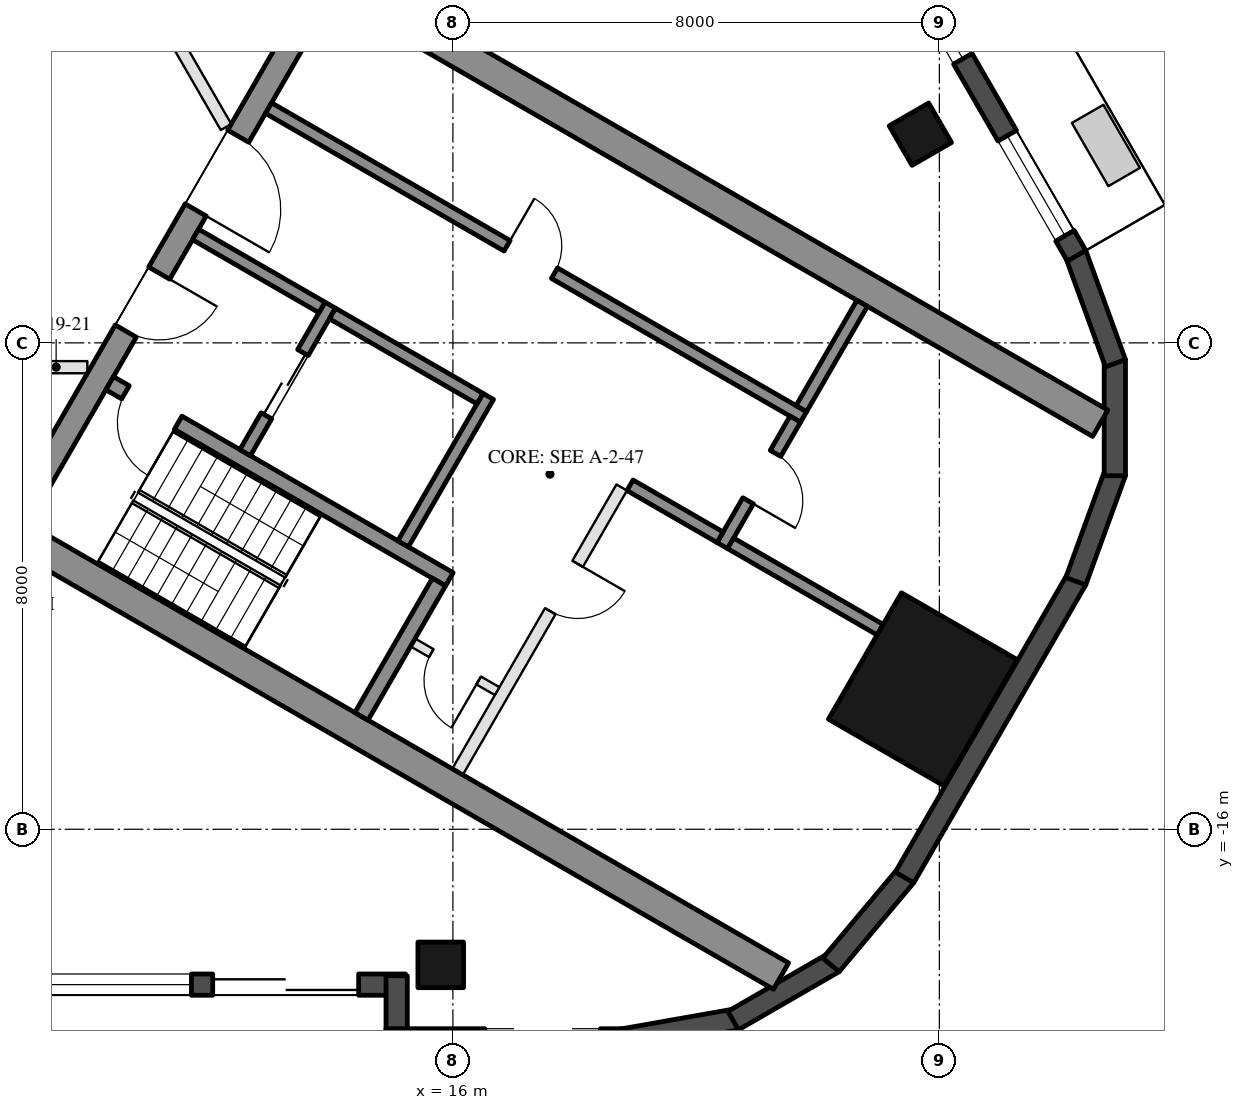
"""IFC4 building model, lengths in metres.
Left out: names, types, materials, properties, quantities, classifications, styles, units other than length and angle.
Written with IfcOpenShell. Run it as: python <this file> out.ifc"""

import sys

from ifc_helpers import new_model, si_unit, direction, frame, frame_2d, origin, origin_2d, place, context, subcontext, project, spatial, rectangle, hollow_rectangle, extrude, element, fill, save


model = new_model("IFC4")
c1 = context("Model", 3, precision=1e-05, world=origin(), true_north=direction((0.0, 1.0)))
c2 = subcontext(c1, "Body", "Model", "MODEL_VIEW")
j1 = project(units=[si_unit("LENGTHUNIT", "METRE"), si_unit("PLANEANGLEUNIT", "RADIAN")], contexts=[c1])
p1 = place(None, origin())
s1 = spatial("IfcSite", under=j1, at=p1, CompositionType="ELEMENT")
p2 = place(p1, origin())
s2 = spatial("IfcBuilding", under=s1, at=p2, CompositionType="ELEMENT")
p3 = place(p2, frame((0.0, 0.0, 205.8)))
s3 = spatial("IfcBuildingStorey", under=s2, at=p3, CompositionType="ELEMENT", Elevation=205.8)
for number, where, z_axis, x_axis in (
    (1, (15.8, -18.23, 0.0), (0.0, 0.0, 1.0), (-1.0, 0.0, 0.0)),
    (2, (23.688, -4.568, 0.0), (0.0, 0.0, 1.0), (-0.5, 0.866, 0.0)),
):
    element("IfcColumn", number, at=place(p3, frame(where, z_axis=z_axis, x_axis=x_axis)), inside=s3, PredefinedType="COLUMN", context=c2, shape_type="SweptSolid", body=[
        extrude(hollow_rectangle(XDim=0.75, YDim=0.75, WallThickness=0.035, at=origin_2d()), origin(), (0.0, 0.0, 1.0), 3.7),
    ])
p4 = place(p3, frame((23.729, -13.7, 0.0), z_axis=(0.0, 0.0, 1.0), x_axis=(0.5, 0.866025403784, 0.0)))
e3 = element("IfcColumn", 3, at=p4, inside=s3, PredefinedType="COLUMN", context=c2, shape_type="SweptSolid", body=[
    extrude(hollow_rectangle(XDim=2.4, YDim=2.2, WallThickness=0.06, at=origin_2d()), origin(), (0.0, 0.0, 1.0), 3.7),
])
p5 = place(p3, frame((8.48, -18.555, 0.0), z_axis=(0.0, 0.0, 1.0), x_axis=(1.0, 0.0, 0.0)))
e4 = element("IfcWall", 4, at=p5, inside=s3, PredefinedType="SOLIDWALL", context=c2, shape_type="SweptSolid", body=[
    extrude(rectangle(XDim=6.74, YDim=0.35, at=frame_2d((3.37, 0.0))), origin(), (0.0, 0.0, 1.0), 3.55),
])
p6 = place(p5, frame((3.57, 0.0, 0.0)))
e5 = element("IfcOpeningElement", 5, at=p6, cuts=e4, PredefinedType="OPENING", context=c2, shape_type="SweptSolid", body=[
    extrude(rectangle(XDim=2.4, YDim=2.4, at=frame_2d((1.2, 1.2))), frame((0.0, 0.185, 0.0), z_axis=(0.0, -1.0, 0.0), x_axis=(1.0, 0.0, 0.0)), (0.0, 0.0, 1.0), 0.37),
])
p7 = place(p5, frame((0.32, 0.0, 0.3)))
e6 = element("IfcOpeningElement", 6, at=p7, cuts=e4, PredefinedType="OPENING", context=c2, shape_type="SweptSolid", body=[
    extrude(rectangle(XDim=2.9, YDim=2.65, at=frame_2d((1.45, 1.325))), frame((0.0, 0.185, 0.0), z_axis=(0.0, -1.0, 0.0), x_axis=(1.0, 0.0, 0.0)), (0.0, 0.0, 1.0), 0.37),
])
p8 = place(p3, frame((15.075, -18.41, 0.0), z_axis=(0.0, 0.0, 1.0), x_axis=(0.0, -1.0, 0.0)))
e7 = element("IfcWall", 7, at=p8, inside=s3, PredefinedType="SOLIDWALL", context=c2, shape_type="SweptSolid", body=[
    extrude(rectangle(XDim=1.22, YDim=0.35, at=frame_2d((0.61, 0.0))), origin(), (0.0, 0.0, 1.0), 3.55),
])
p9 = place(p3, frame((14.9, -19.455, 0.0), z_axis=(0.0, 0.0, 1.0), x_axis=(1.0, 0.0, 0.0)))
e8 = element("IfcWall", 8, at=p9, inside=s3, PredefinedType="SOLIDWALL", context=c2, shape_type="SweptSolid", body=[
    extrude(rectangle(XDim=3.916, YDim=0.35, at=frame_2d((1.958, 0.0))), origin(), (0.0, 0.0, 1.0), 3.55),
])
p10 = place(p9, frame((1.625, 0.0, 0.3)))
e9 = element("IfcOpeningElement", 9, at=p10, cuts=e8, PredefinedType="OPENING", context=c2, shape_type="SweptSolid", body=[
    extrude(rectangle(XDim=1.9, YDim=2.65, at=frame_2d((0.95, 1.325))), frame((0.0, 0.185, 0.0), z_axis=(0.0, -1.0, 0.0), x_axis=(1.0, 0.0, 0.0)), (0.0, 0.0, 1.0), 0.37),
])
p11 = place(p3, frame((18.785, -19.458, 0.0), z_axis=(0.0, 0.0, 1.0), x_axis=(0.984798995425, 0.173697837091, 0.0)))
e10 = element("IfcWall", 10, at=p11, inside=s3, PredefinedType="SOLIDWALL", context=c2, shape_type="SweptSolid", body=[
    extrude(rectangle(XDim=1.91, YDim=0.35, at=frame_2d((0.955, 0.0))), origin(), (0.0, 0.0, 1.0), 3.55),
])
for number, where, z_axis, x_axis in (
    (11, (20.61, -19.147, 0.0), (0.0, 0.0, 1.0), (0.866, 0.5, 0.0)),
    (12, (22.217, -18.231, 0.0), (0.0, 0.0, 1.0), (0.643, 0.766, 0.0)),
):
    element("IfcWall", number, at=place(p3, frame(where, z_axis=z_axis, x_axis=x_axis)), inside=s3, PredefinedType="SOLIDWALL", context=c2, shape_type="SweptSolid", body=[
        extrude(rectangle(XDim=1.91, YDim=0.35, at=frame_2d((0.955, 0.0))), origin(), (0.0, 0.0, 1.0), 3.55),
    ])
p12 = place(p3, frame((23.427, -16.792, 0.0), z_axis=(0.0, 0.0, 1.0), x_axis=(0.500018773155, 0.866014564827, 0.0)))
e13 = element("IfcWall", 13, at=p12, inside=s3, PredefinedType="SOLIDWALL", context=c2, shape_type="SweptSolid", body=[
    extrude(rectangle(XDim=5.658, YDim=0.35, at=frame_2d((2.829, 0.0))), origin(), (0.0, 0.0, 1.0), 3.55),
])
for number, where, z_axis, x_axis in (
    (14, (26.244, -11.92, 0.0), (0.0, 0.0, 1.0), (0.342, 0.94, 0.0)),
    (15, (26.886, -10.185, 0.0), (0.0, 0.0, 1.0), (0.0, 1.0, 0.0)),
    (16, (26.897, -8.335, 0.0), (0.0, 0.0, 1.0), (-0.342, 0.94, 0.0)),
):
    element("IfcWall", number, at=place(p3, frame(where, z_axis=z_axis, x_axis=x_axis)), inside=s3, PredefinedType="SOLIDWALL", context=c2, shape_type="SweptSolid", body=[
        extrude(rectangle(XDim=1.91, YDim=0.35, at=frame_2d((0.955, 0.0))), origin(), (0.0, 0.0, 1.0), 3.55),
    ])
p13 = place(p3, frame((26.257, -6.567, 0.0), z_axis=(0.0, 0.0, 1.0), x_axis=(-0.500023526245, 0.866011820475, 0.0)))
e17 = element("IfcWall", 17, at=p13, inside=s3, PredefinedType="SOLIDWALL", context=c2, shape_type="SweptSolid", body=[
    extrude(rectangle(XDim=11.816, YDim=0.35, at=frame_2d((5.908, 0.0))), origin(), (0.0, 0.0, 1.0), 3.55),
])
p14 = place(p13, frame((0.38, 0.0, 0.3)))
e18 = element("IfcOpeningElement", 18, at=p14, cuts=e17, PredefinedType="OPENING", context=c2, shape_type="SweptSolid", body=[
    extrude(rectangle(XDim=1.9, YDim=2.65, at=frame_2d((0.95, 1.325))), frame((0.0, 0.185, 0.0), z_axis=(0.0, -1.0, 0.0), x_axis=(1.0, 0.0, 0.0)), (0.0, 0.0, 1.0), 0.37),
])
p15 = place(p13, frame((7.791, 0.0, 0.0)))
e19 = element("IfcOpeningElement", 19, at=p15, cuts=e17, PredefinedType="OPENING", context=c2, shape_type="SweptSolid", body=[
    extrude(rectangle(XDim=2.4, YDim=2.4, at=frame_2d((1.2, 1.2))), frame((0.0, 0.185, 0.0), z_axis=(0.0, -1.0, 0.0), x_axis=(1.0, 0.0, 0.0)), (0.0, 0.0, 1.0), 0.37),
])
p16 = place(p13, frame((3.741, 0.0, 0.3)))
e20 = element("IfcOpeningElement", 20, at=p16, cuts=e17, PredefinedType="OPENING", context=c2, shape_type="SweptSolid", body=[
    extrude(rectangle(XDim=1.7, YDim=2.65, at=frame_2d((0.85, 1.325))), frame((0.0, 0.185, 0.0), z_axis=(0.0, -1.0, 0.0), x_axis=(1.0, 0.0, 0.0)), (0.0, 0.0, 1.0), 0.37),
])
p17 = place(p13, frame((5.741, 0.0, 0.3)))
e21 = element("IfcOpeningElement", 21, at=p17, cuts=e17, PredefinedType="OPENING", context=c2, shape_type="SweptSolid", body=[
    extrude(rectangle(XDim=1.7, YDim=2.65, at=frame_2d((0.85, 1.325))), frame((0.0, 0.185, 0.0), z_axis=(0.0, -1.0, 0.0), x_axis=(1.0, 0.0, 0.0)), (0.0, 0.0, 1.0), 0.37),
])
for number, where, z_axis, x_axis in (
    (22, (8.547, -10.997, 0.0), (0.0, 0.0, 1.0), (0.866, -0.5, 0.0)),
    (23, (13.797, -1.903, 0.0), (0.0, 0.0, 1.0), (0.866, -0.5, 0.0)),
):
    element("IfcWall", number, at=place(p3, frame(where, z_axis=z_axis, x_axis=x_axis)), inside=s3, PredefinedType="SHEAR", context=c2, shape_type="SweptSolid", body=[
        extrude(rectangle(XDim=14.837, YDim=0.5, at=frame_2d((7.418, 0.0))), origin(), (0.0, 0.0, 1.0), 3.5),
    ])
p18 = place(p3, frame((8.845, -10.88, 0.0), z_axis=(0.0, 0.0, 1.0), x_axis=(0.500004234368, 0.866022959057, 0.0)))
e24 = element("IfcWall", 24, at=p18, inside=s3, PredefinedType="SHEAR", context=c2, shape_type="SweptSolid", body=[
    extrude(rectangle(XDim=10.0, YDim=0.4, at=frame_2d((5.0, 0.0))), origin(), (0.0, 0.0, 1.0), 3.5),
])
p19 = place(p18, frame((3.55, 0.0, 0.0)))
e25 = element("IfcOpeningElement", 25, at=p19, cuts=e24, PredefinedType="OPENING", context=c2, shape_type="SweptSolid", body=[
    extrude(rectangle(XDim=1.1, YDim=2.1, at=frame_2d((0.55, 1.05))), frame((0.0, 0.21, 0.0), z_axis=(0.0, -1.0, 0.0), x_axis=(1.0, 0.0, 0.0)), (0.0, 0.0, 1.0), 0.42),
])
p20 = place(p18, frame((5.85, 0.0, 0.0)))
e26 = element("IfcOpeningElement", 26, at=p20, cuts=e24, PredefinedType="OPENING", context=c2, shape_type="SweptSolid", body=[
    extrude(rectangle(XDim=1.4, YDim=2.1, at=frame_2d((0.7, 1.05))), frame((0.0, 0.21, 0.0), z_axis=(0.0, -1.0, 0.0), x_axis=(1.0, 0.0, 0.0)), (0.0, 0.0, 1.0), 0.42),
])
p21 = place(p3, frame((10.356, -8.664, 0.0), z_axis=(0.0, 0.0, 1.0), x_axis=(0.866028629588, -0.499994412703, 0.0)))
e27 = element("IfcWall", 27, at=p21, inside=s3, PredefinedType="SHEAR", context=c2, shape_type="SweptSolid", body=[
    extrude(rectangle(XDim=6.45, YDim=0.25, at=frame_2d((3.225, 0.0))), origin(), (0.0, 0.0, 1.0), 3.5),
])
p22 = place(p21, frame((0.3, 0.0, 0.0)))
e28 = element("IfcOpeningElement", 28, at=p22, cuts=e27, PredefinedType="OPENING", context=c2, shape_type="SweptSolid", body=[
    extrude(rectangle(XDim=1.0, YDim=2.1, at=frame_2d((0.5, 1.05))), frame((0.0, 0.135, 0.0), z_axis=(0.0, -1.0, 0.0), x_axis=(1.0, 0.0, 0.0)), (0.0, 0.0, 1.0), 0.27),
])
p23 = place(p3, frame((14.496, -14.143, 0.0), z_axis=(0.0, 0.0, 1.0), x_axis=(0.500062241894, 0.865989465428, 0.0)))
e29 = element("IfcWall", 29, at=p23, inside=s3, PredefinedType="SHEAR", context=c2, shape_type="SweptSolid", body=[
    extrude(rectangle(XDim=2.55, YDim=0.25, at=frame_2d((1.275, 0.0))), origin(), (0.0, 0.0, 1.0), 3.5),
])
p24 = place(p3, frame((15.181, -11.305, 0.0), z_axis=(0.0, 0.0, 1.0), x_axis=(0.49994636267, 0.866056369097, 0.0)))
e30 = element("IfcWall", 30, at=p24, inside=s3, PredefinedType="SHEAR", context=c2, shape_type="SweptSolid", body=[
    extrude(rectangle(XDim=2.8, YDim=0.2, at=frame_2d((1.4, 0.0))), origin(), (0.0, 0.0, 1.0), 3.5),
])
p25 = place(p3, frame((12.583, -9.805, 0.0), z_axis=(0.0, 0.0, 1.0), x_axis=(0.49994636267, 0.866056369097, 0.0)))
e31 = element("IfcWall", 31, at=p25, inside=s3, PredefinedType="SHEAR", context=c2, shape_type="SweptSolid", body=[
    extrude(rectangle(XDim=2.8, YDim=0.2, at=frame_2d((1.4, 0.0))), origin(), (0.0, 0.0, 1.0), 3.5),
])
p26 = place(p25, frame((0.7, 0.0, 0.0)))
e32 = element("IfcOpeningElement", 32, at=p26, cuts=e31, PredefinedType="OPENING", context=c2, shape_type="SweptSolid", body=[
    extrude(rectangle(XDim=1.2, YDim=2.1, at=frame_2d((0.6, 1.05))), frame((0.0, 0.11, 0.0), z_axis=(0.0, -1.0, 0.0), x_axis=(1.0, 0.0, 0.0)), (0.0, 0.0, 1.0), 0.22),
])
p27 = place(p3, frame((11.768, -6.217, 0.0), z_axis=(0.0, 0.0, 1.0), x_axis=(0.866050077142, -0.499957262057, 0.0)))
e33 = element("IfcWall", 33, at=p27, inside=s3, PredefinedType="SHEAR", context=c2, shape_type="SweptSolid", body=[
    extrude(rectangle(XDim=2.4, YDim=0.2, at=frame_2d((1.2, 0.0))), origin(), (0.0, 0.0, 1.0), 3.5),
])
p28 = place(p3, frame((14.02, -7.517, 0.0), z_axis=(0.0, 0.0, 1.0), x_axis=(0.866034573852, -0.49998411664, 0.0)))
e34 = element("IfcWall", 34, at=p28, inside=s3, PredefinedType="SHEAR", context=c2, shape_type="SweptSolid", body=[
    extrude(rectangle(XDim=2.8, YDim=0.2, at=frame_2d((1.4, 0.0))), origin(), (0.0, 0.0, 1.0), 3.5),
])
p29 = place(p3, frame((12.968, -4.138, 0.0), z_axis=(0.0, 0.0, 1.0), x_axis=(0.866028328073, -0.49999493495, 0.0)))
e35 = element("IfcWall", 35, at=p29, inside=s3, PredefinedType="SHEAR", context=c2, shape_type="SweptSolid", body=[
    extrude(rectangle(XDim=10.16, YDim=0.2, at=frame_2d((5.08, 0.0))), origin(), (0.0, 0.0, 1.0), 3.5),
])
p30 = place(p29, frame((4.53, 0.0, 0.0)))
e36 = element("IfcOpeningElement", 36, at=p30, cuts=e35, PredefinedType="OPENING", context=c2, shape_type="SweptSolid", body=[
    extrude(rectangle(XDim=0.9, YDim=2.1, at=frame_2d((0.45, 1.05))), frame((0.0, 0.11, 0.0), z_axis=(0.0, -1.0, 0.0), x_axis=(1.0, 0.0, 0.0)), (0.0, 0.0, 1.0), 0.22),
])
p31 = place(p3, frame((20.43, -11.333, 0.0), z_axis=(0.0, 0.0, 1.0), x_axis=(0.500001309137, 0.866024647952, 0.0)))
e37 = element("IfcWall", 37, at=p31, inside=s3, PredefinedType="SHEAR", context=c2, shape_type="SweptSolid", body=[
    extrude(rectangle(XDim=2.4, YDim=0.2, at=frame_2d((1.2, 0.0))), origin(), (0.0, 0.0, 1.0), 3.5),
])
p32 = place(p31, frame((0.85, 0.0, 0.0)))
e38 = element("IfcOpeningElement", 38, at=p32, cuts=e37, PredefinedType="OPENING", context=c2, shape_type="SweptSolid", body=[
    extrude(rectangle(XDim=0.9, YDim=2.1, at=frame_2d((0.45, 1.05))), frame((0.0, 0.11, 0.0), z_axis=(0.0, -1.0, 0.0), x_axis=(1.0, 0.0, 0.0)), (0.0, 0.0, 1.0), 0.22),
])
p33 = place(p3, frame((18.913, -10.342, 0.0), z_axis=(0.0, 0.0, 1.0), x_axis=(0.866038183914, -0.499977863513, 0.0)))
e39 = element("IfcWall", 39, at=p33, inside=s3, PredefinedType="SHEAR", context=c2, shape_type="SweptSolid", body=[
    extrude(rectangle(XDim=1.71, YDim=0.2, at=frame_2d((0.855, 0.0))), origin(), (0.0, 0.0, 1.0), 3.5),
])
p34 = place(p3, frame((21.73, -9.082, 0.0), z_axis=(0.0, 0.0, 1.0), x_axis=(0.50002537861, 0.866010750942, 0.0)))
e40 = element("IfcWall", 40, at=p34, inside=s3, PredefinedType="SHEAR", context=c2, shape_type="SweptSolid", body=[
    extrude(rectangle(XDim=2.0, YDim=0.2, at=frame_2d((1.0, 0.0))), origin(), (0.0, 0.0, 1.0), 3.5),
])
p35 = place(p3, frame((20.567, -11.297, 0.0), z_axis=(0.0, 0.0, 1.0), x_axis=(0.866055327414, -0.49994816717, 0.0)))
e41 = element("IfcWall", 41, at=p35, inside=s3, PredefinedType="SHEAR", context=c2, shape_type="SweptSolid", body=[
    extrude(rectangle(XDim=2.84, YDim=0.2, at=frame_2d((1.42, 0.0))), origin(), (0.0, 0.0, 1.0), 3.5),
])
p36 = place(p3, frame((16.076, -15.055, 0.0), z_axis=(0.0, 0.0, 1.0), x_axis=(0.499995103361, 0.866028230842, 0.0)))
e42 = element("IfcWall", 42, at=p36, inside=s3, PredefinedType="PARTITIONING", context=c2, shape_type="SweptSolid", body=[
    extrude(rectangle(XDim=5.4, YDim=0.2, at=frame_2d((2.7, 0.0))), origin(), (0.0, 0.0, 1.0), 3.5),
])
p37 = place(p36, frame((3.05, 0.0, 0.0)))
e43 = element("IfcOpeningElement", 43, at=p37, cuts=e42, PredefinedType="OPENING", context=c2, shape_type="SweptSolid", body=[
    extrude(rectangle(XDim=0.9, YDim=2.1, at=frame_2d((0.45, 1.05))), frame((0.0, 0.11, 0.0), z_axis=(0.0, -1.0, 0.0), x_axis=(1.0, 0.0, 0.0)), (0.0, 0.0, 1.0), 0.22),
])
p38 = place(p3, frame((15.342, -12.928, 0.0), z_axis=(0.0, 0.0, 1.0), x_axis=(0.865989903783, -0.500061482766, 0.0)))
e44 = element("IfcWall", 44, at=p38, inside=s3, PredefinedType="PARTITIONING", context=c2, shape_type="SweptSolid", body=[
    extrude(rectangle(XDim=1.6, YDim=0.15, at=frame_2d((0.8, 0.0))), origin(), (0.0, 0.0, 1.0), 3.5),
])
p39 = place(p38, frame((0.35, 0.0, 0.0)))
e45 = element("IfcOpeningElement", 45, at=p39, cuts=e44, PredefinedType="OPENING", context=c2, shape_type="SweptSolid", body=[
    extrude(rectangle(XDim=0.9, YDim=2.1, at=frame_2d((0.45, 1.05))), frame((0.0, 0.085, 0.0), z_axis=(0.0, -1.0, 0.0), x_axis=(1.0, 0.0, 0.0)), (0.0, 0.0, 1.0), 0.17),
])
p40 = place(p3, frame((9.988, -8.4, 0.0), z_axis=(0.0, 0.0, 1.0), x_axis=(-1.0, 0.0, 0.0)))
e46 = element("IfcWall", 46, at=p40, inside=s3, PredefinedType="PARTITIONING", context=c2, shape_type="SweptSolid", body=[
    extrude(rectangle(XDim=4.277, YDim=0.2, at=frame_2d((2.139, 0.0))), origin(), (0.0, 0.0, 1.0), 2.95),
])
p41 = place(p40, frame((1.639, 0.0, 0.0)))
e47 = element("IfcOpeningElement", 47, at=p41, cuts=e46, PredefinedType="OPENING", context=c2, shape_type="SweptSolid", body=[
    extrude(rectangle(XDim=1.0, YDim=2.1, at=frame_2d((0.5, 1.05))), frame((0.0, 0.11, 0.0), z_axis=(0.0, -1.0, 0.0), x_axis=(1.0, 0.0, 0.0)), (0.0, 0.0, 1.0), 0.22),
])
p42 = place(p3, frame((10.225, -0.909, 0.0), z_axis=(0.0, 0.0, 1.0), x_axis=(0.500011931275, -0.86601851515, 0.0)))
e48 = element("IfcWall", 48, at=p42, inside=s3, PredefinedType="PARTITIONING", context=c2, shape_type="SweptSolid", body=[
    extrude(rectangle(XDim=4.088, YDim=0.2, at=frame_2d((2.044, 0.0))), origin(), (0.0, 0.0, 1.0), 2.95),
])
p43 = place(p42, frame((1.544, 0.0, 0.0)))
e49 = element("IfcOpeningElement", 49, at=p43, cuts=e48, PredefinedType="OPENING", context=c2, shape_type="SweptSolid", body=[
    extrude(rectangle(XDim=1.0, YDim=2.1, at=frame_2d((0.5, 1.05))), frame((0.0, 0.11, 0.0), z_axis=(0.0, -1.0, 0.0), x_axis=(1.0, 0.0, 0.0)), (0.0, 0.0, 1.0), 0.22),
])
p44 = place(p6, frame((2.4, 0.0, 0.0), z_axis=(0.0, 0.0, 1.0), x_axis=(-1.0, 0.0, 0.0)))
e50 = element("IfcDoor", 50, at=p44, inside=s3, OperationType="SLIDING_TO_LEFT", PredefinedType="DOOR", context=c2, shape_type="SweptSolid", body=[
    extrude(rectangle(XDim=2.4, YDim=2.4, at=frame_2d((1.2, 1.2))), frame((0.0, 0.025, 0.0), z_axis=(0.0, -1.0, 0.0), x_axis=(1.0, 0.0, 0.0)), (0.0, 0.0, 1.0), 0.05),
])
fill(e5, e50)
p45 = place(p7, origin())
e51 = element("IfcWindow", 51, at=p45, inside=s3, PartitioningType="SINGLE_PANEL", PredefinedType="WINDOW", context=c2, shape_type="SweptSolid", body=[
    extrude(rectangle(XDim=2.9, YDim=2.65, at=frame_2d((1.45, 1.325))), frame((0.0, 0.03, 0.0), z_axis=(0.0, -1.0, 0.0), x_axis=(1.0, 0.0, 0.0)), (0.0, 0.0, 1.0), 0.06),
])
fill(e6, e51)
p46 = place(p14, origin())
e52 = element("IfcWindow", 52, at=p46, inside=s3, PartitioningType="SINGLE_PANEL", PredefinedType="WINDOW", context=c2, shape_type="SweptSolid", body=[
    extrude(rectangle(XDim=1.9, YDim=2.65, at=frame_2d((0.95, 1.325))), frame((0.0, 0.03, 0.0), z_axis=(0.0, -1.0, 0.0), x_axis=(1.0, 0.0, 0.0)), (0.0, 0.0, 1.0), 0.06),
])
fill(e18, e52)
p47 = place(p16, origin())
e53 = element("IfcWindow", 53, at=p47, inside=s3, PartitioningType="SINGLE_PANEL", PredefinedType="WINDOW", context=c2, shape_type="SweptSolid", body=[
    extrude(rectangle(XDim=1.7, YDim=2.65, at=frame_2d((0.85, 1.325))), frame((0.0, 0.03, 0.0), z_axis=(0.0, -1.0, 0.0), x_axis=(1.0, 0.0, 0.0)), (0.0, 0.0, 1.0), 0.06),
])
fill(e20, e53)
p48 = place(p26, origin())
e54 = element("IfcDoor", 54, at=p48, inside=s3, OperationType="DOUBLE_DOOR_SLIDING", PredefinedType="DOOR", context=c2, shape_type="SweptSolid", body=[
    extrude(rectangle(XDim=1.2, YDim=2.1, at=frame_2d((0.6, 1.05))), frame((0.0, 0.025, 0.0), z_axis=(0.0, -1.0, 0.0), x_axis=(1.0, 0.0, 0.0)), (0.0, 0.0, 1.0), 0.05),
])
fill(e32, e54)
p49 = place(p39, frame((0.9, 0.0, 0.0), z_axis=(0.0, 0.0, 1.0), x_axis=(-1.0, 0.0, 0.0)))
e55 = element("IfcDoor", 55, at=p49, inside=s3, OperationType="SINGLE_SWING_LEFT", PredefinedType="DOOR", context=c2, shape_type="SweptSolid", body=[
    extrude(rectangle(XDim=0.9, YDim=2.1, at=frame_2d((0.45, 1.05))), frame((0.0, 0.025, 0.0), z_axis=(0.0, -1.0, 0.0), x_axis=(1.0, 0.0, 0.0)), (0.0, 0.0, 1.0), 0.05),
])
fill(e45, e55)
p50 = place(p30, origin())
e56 = element("IfcDoor", 56, at=p50, inside=s3, OperationType="SINGLE_SWING_LEFT", PredefinedType="DOOR", context=c2, shape_type="SweptSolid", body=[
    extrude(rectangle(XDim=0.9, YDim=2.1, at=frame_2d((0.45, 1.05))), frame((0.0, 0.025, 0.0), z_axis=(0.0, -1.0, 0.0), x_axis=(1.0, 0.0, 0.0)), (0.0, 0.0, 1.0), 0.05),
])
fill(e36, e56)
p51 = place(p32, frame((0.9, 0.0, 0.0), z_axis=(0.0, 0.0, 1.0), x_axis=(-1.0, 0.0, 0.0)))
e57 = element("IfcDoor", 57, at=p51, inside=s3, OperationType="SINGLE_SWING_RIGHT", PredefinedType="DOOR", context=c2, shape_type="SweptSolid", body=[
    extrude(rectangle(XDim=0.9, YDim=2.1, at=frame_2d((0.45, 1.05))), frame((0.0, 0.025, 0.0), z_axis=(0.0, -1.0, 0.0), x_axis=(1.0, 0.0, 0.0)), (0.0, 0.0, 1.0), 0.05),
])
fill(e38, e57)
p52 = place(p37, frame((0.9, 0.0, 0.0), z_axis=(0.0, 0.0, 1.0), x_axis=(-1.0, 0.0, 0.0)))
e58 = element("IfcDoor", 58, at=p52, inside=s3, OperationType="SINGLE_SWING_LEFT", PredefinedType="DOOR", context=c2, shape_type="SweptSolid", body=[
    extrude(rectangle(XDim=0.9, YDim=2.1, at=frame_2d((0.45, 1.05))), frame((0.0, 0.025, 0.0), z_axis=(0.0, -1.0, 0.0), x_axis=(1.0, 0.0, 0.0)), (0.0, 0.0, 1.0), 0.05),
])
fill(e43, e58)
p53 = place(p19, frame((1.1, 0.0, 0.0), z_axis=(0.0, 0.0, 1.0), x_axis=(-1.0, 0.0, 0.0)))
e59 = element("IfcDoor", 59, at=p53, inside=s3, OperationType="SINGLE_SWING_LEFT", PredefinedType="DOOR", context=c2, shape_type="SweptSolid", body=[
    extrude(rectangle(XDim=1.1, YDim=2.1, at=frame_2d((0.55, 1.05))), frame((0.0, 0.025, 0.0), z_axis=(0.0, -1.0, 0.0), x_axis=(1.0, 0.0, 0.0)), (0.0, 0.0, 1.0), 0.05),
])
fill(e25, e59)
p54 = place(p20, frame((1.4, 0.0, 0.0), z_axis=(0.0, 0.0, 1.0), x_axis=(-1.0, 0.0, 0.0)))
e60 = element("IfcDoor", 60, at=p54, inside=s3, OperationType="DOUBLE_DOOR_SINGLE_SWING", PredefinedType="DOOR", context=c2, shape_type="SweptSolid", body=[
    extrude(rectangle(XDim=1.4, YDim=2.1, at=frame_2d((0.7, 1.05))), frame((0.0, 0.025, 0.0), z_axis=(0.0, -1.0, 0.0), x_axis=(1.0, 0.0, 0.0)), (0.0, 0.0, 1.0), 0.05),
])
fill(e26, e60)
p55 = place(p22, frame((1.0, 0.0, 0.0), z_axis=(0.0, 0.0, 1.0), x_axis=(-1.0, 0.0, 0.0)))
e61 = element("IfcDoor", 61, at=p55, inside=s3, OperationType="SINGLE_SWING_LEFT", PredefinedType="DOOR", context=c2, shape_type="SweptSolid", body=[
    extrude(rectangle(XDim=1.0, YDim=2.1, at=frame_2d((0.5, 1.05))), frame((0.0, 0.025, 0.0), z_axis=(0.0, -1.0, 0.0), x_axis=(1.0, 0.0, 0.0)), (0.0, 0.0, 1.0), 0.05),
])
fill(e28, e61)
save(model, sys.argv[1])
